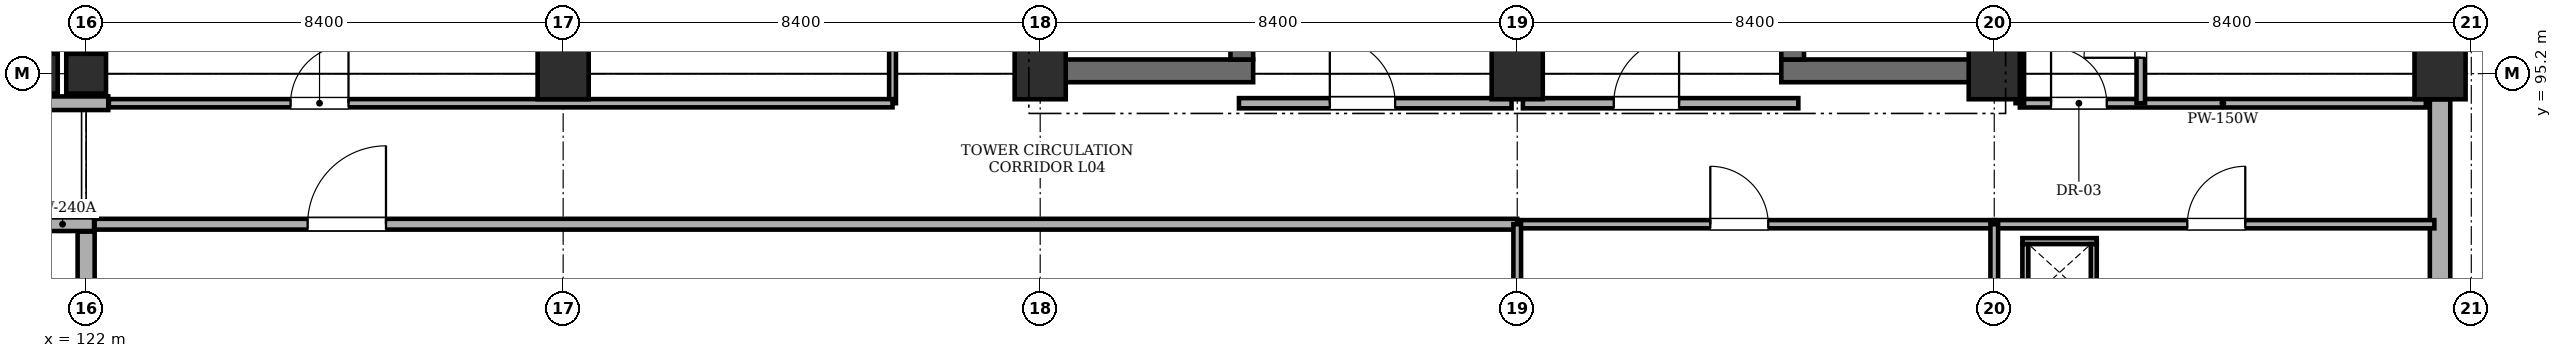
"""IFC4 building model, lengths in metres.
Left out: names, types, materials, properties, quantities, classifications, styles, units other than length and angle.
Written with IfcOpenShell. Run it as: python <this file> out.ifc"""

import sys

from ifc_helpers import new_model, si_unit, direction, frame, frame_2d, origin, origin_2d, place, context, subcontext, project, spatial, rectangle, extrude, element, fill, save


model = new_model("IFC4")
c1 = context("Model", 3, precision=1e-05, world=origin(), true_north=direction((0.0, 1.0)))
c2 = subcontext(c1, "Body", "Model", "MODEL_VIEW")
j1 = project(units=[si_unit("LENGTHUNIT", "METRE"), si_unit("PLANEANGLEUNIT", "RADIAN")], contexts=[c1])
p1 = place(None, origin())
s1 = spatial("IfcSite", under=j1, at=p1, CompositionType="ELEMENT")
p2 = place(p1, origin())
s2 = spatial("IfcBuilding", under=s1, at=p2, CompositionType="ELEMENT")
p3 = place(p2, frame((0.0, 0.0, 14.7)))
s3 = spatial("IfcBuildingStorey", under=s2, at=p3, CompositionType="ELEMENT", Elevation=14.7)
p4 = place(p3, frame((121.15, 95.2, 0.0), z_axis=(0.0, 0.0, 1.0), x_axis=(1.0, 0.0, 0.0)))
e1 = element("IfcColumn", 1, at=p4, inside=s3, PredefinedType="COLUMN", context=c2, shape_type="SweptSolid", body=[
    extrude(rectangle(XDim=0.7, YDim=0.7, at=origin_2d()), origin(), (0.0, 0.0, 1.0), 4.5),
])
p5 = place(p3, frame((122.0, 95.2, 0.0), z_axis=(0.0, 0.0, 1.0), x_axis=(1.0, 0.0, 0.0)))
e2 = element("IfcColumn", 2, at=p5, inside=s3, PredefinedType="COLUMN", context=c2, shape_type="SweptSolid", body=[
    extrude(rectangle(XDim=0.7, YDim=0.7, at=origin_2d()), origin(), (0.0, 0.0, 1.0), 4.26),
])
for number, where, z_axis, x_axis in (
    (3, (130.4, 95.2, 0.0), (0.0, 0.0, 1.0), (1.0, 0.0, 0.0)),
    (4, (138.8, 95.2, 0.0), (0.0, 0.0, 1.0), (1.0, 0.0, 0.0)),
    (5, (147.2, 95.2, 0.0), (0.0, 0.0, 1.0), (1.0, 0.0, 0.0)),
    (6, (155.6, 95.2, 0.0), (0.0, 0.0, 1.0), (1.0, 0.0, 0.0)),
    (7, (163.45, 95.2, 0.0), (0.0, 0.0, 1.0), (1.0, 0.0, 0.0)),
):
    element("IfcColumn", number, at=place(p3, frame(where, z_axis=z_axis, x_axis=x_axis)), inside=s3, PredefinedType="COLUMN", context=c2, shape_type="SweptSolid", body=[
        extrude(rectangle(XDim=0.9, YDim=0.9, at=origin_2d()), origin(), (0.0, 0.0, 1.0), 4.26),
    ])
p6 = place(p3, frame((138.65, 95.25, 0.0), z_axis=(0.0, 0.0, 1.0), x_axis=(1.0, 0.0, 0.0)))
e8 = element("IfcWall", 8, at=p6, inside=s3, PredefinedType="SHEAR", context=c2, shape_type="SweptSolid", body=[
    extrude(rectangle(XDim=3.9, YDim=0.4, at=frame_2d((1.95, 0.0))), origin(), (0.0, 0.0, 1.0), 4.26),
])
p7 = place(p3, frame((138.85, 95.45, 0.0), z_axis=(0.0, 0.0, 1.0), x_axis=(0.0, 1.0, 0.0)))
e9 = element("IfcWall", 9, at=p7, inside=s3, PredefinedType="SHEAR", context=c2, shape_type="SweptSolid", body=[
    extrude(rectangle(XDim=7.9, YDim=0.4, at=frame_2d((3.95, 0.0))), origin(), (0.0, 0.0, 1.0), 4.26),
])
p8 = place(p3, frame((142.35, 95.45, 0.0), z_axis=(0.0, 0.0, 1.0), x_axis=(0.0, 1.0, 0.0)))
e10 = element("IfcWall", 10, at=p8, inside=s3, PredefinedType="SHEAR", context=c2, shape_type="SweptSolid", body=[
    extrude(rectangle(XDim=7.9, YDim=0.4, at=frame_2d((3.95, 0.0))), origin(), (0.0, 0.0, 1.0), 4.26),
])
p9 = place(p8, frame((0.22, 0.0, 0.0)))
e11 = element("IfcOpeningElement", 11, at=p9, cuts=e10, PredefinedType="OPENING", context=c2, shape_type="SweptSolid", body=[
    extrude(rectangle(XDim=1.15, YDim=2.15, at=frame_2d((0.575, 1.075))), frame((0.0, 0.21, 0.0), z_axis=(0.0, -1.0, 0.0), x_axis=(1.0, 0.0, 0.0)), (0.0, 0.0, 1.0), 0.42),
])
p10 = place(p3, frame((151.85, 95.25, 0.0), z_axis=(0.0, 0.0, 1.0), x_axis=(1.0, 0.0, 0.0)))
e12 = element("IfcWall", 12, at=p10, inside=s3, PredefinedType="SHEAR", context=c2, shape_type="SweptSolid", body=[
    extrude(rectangle(XDim=3.9, YDim=0.4, at=frame_2d((1.95, 0.0))), origin(), (0.0, 0.0, 1.0), 4.26),
])
p11 = place(p3, frame((152.05, 95.45, 0.0), z_axis=(0.0, 0.0, 1.0), x_axis=(0.0, 1.0, 0.0)))
e13 = element("IfcWall", 13, at=p11, inside=s3, PredefinedType="SHEAR", context=c2, shape_type="SweptSolid", body=[
    extrude(rectangle(XDim=7.9, YDim=0.4, at=frame_2d((3.95, 0.0))), origin(), (0.0, 0.0, 1.0), 4.26),
])
p12 = place(p11, frame((0.35, 0.0, 0.0)))
e14 = element("IfcOpeningElement", 14, at=p12, cuts=e13, PredefinedType="OPENING", context=c2, shape_type="SweptSolid", body=[
    extrude(rectangle(XDim=1.15, YDim=2.15, at=frame_2d((0.575, 1.075))), frame((0.0, 0.21, 0.0), z_axis=(0.0, -1.0, 0.0), x_axis=(1.0, 0.0, 0.0)), (0.0, 0.0, 1.0), 0.42),
])
p13 = place(p3, frame((155.55, 95.45, 0.0), z_axis=(0.0, 0.0, 1.0), x_axis=(0.0, 1.0, 0.0)))
e15 = element("IfcWall", 15, at=p13, inside=s3, PredefinedType="SHEAR", context=c2, shape_type="SweptSolid", body=[
    extrude(rectangle(XDim=7.9, YDim=0.4, at=frame_2d((3.95, 0.0))), origin(), (0.0, 0.0, 1.0), 4.26),
])
p14 = place(p3, frame((163.45, 94.75, 0.0), z_axis=(0.0, 0.0, 1.0), x_axis=(0.0, -1.0, 0.0)))
e16 = element("IfcWall", 16, at=p14, inside=s3, PredefinedType="STANDARD", context=c2, shape_type="SweptSolid", body=[
    extrude(rectangle(XDim=7.5, YDim=0.36, at=frame_2d((3.75, 0.0))), origin(), (0.0, 0.0, 1.0), 3.56),
])
p15 = place(p14, frame((4.2, 0.0, 1.1)))
e17 = element("IfcOpeningElement", 17, at=p15, cuts=e16, PredefinedType="OPENING", context=c2, shape_type="SweptSolid", body=[
    extrude(rectangle(XDim=1.8, YDim=1.8, at=frame_2d((0.9, 0.9))), frame((0.0, 0.19, 0.0), z_axis=(0.0, -1.0, 0.0), x_axis=(1.0, 0.0, 0.0)), (0.0, 0.0, 1.0), 0.38),
])
p16 = place(p3, frame((122.0, 87.15, 0.0), z_axis=(0.0, 0.0, 1.0), x_axis=(0.0, 1.0, 0.0)))
e18 = element("IfcWall", 18, at=p16, inside=s3, PredefinedType="STANDARD", context=c2, shape_type="SweptSolid", body=[
    extrude(rectangle(XDim=5.27, YDim=0.3, at=frame_2d((2.635, 0.0))), origin(), (0.0, 0.0, 1.0), 3.51),
])
p17 = place(p3, frame((122.14, 92.55, 0.0), z_axis=(0.0, 0.0, 1.0), x_axis=(-1.0, 0.0, 0.0)))
e19 = element("IfcWall", 19, at=p17, inside=s3, PredefinedType="STANDARD", context=c2, shape_type="SweptSolid", body=[
    extrude(rectangle(XDim=1.11, YDim=0.24, at=frame_2d((0.555, 0.0))), origin(), (0.0, 0.0, 1.0), 4.26),
])
p18 = place(p3, frame((121.03, 94.68, 0.0), z_axis=(0.0, 0.0, 1.0), x_axis=(1.0, 0.0, 0.0)))
e20 = element("IfcWall", 20, at=p18, inside=s3, PredefinedType="STANDARD", context=c2, shape_type="SweptSolid", body=[
    extrude(rectangle(XDim=1.36, YDim=0.24, at=frame_2d((0.68, 0.0))), origin(), (0.0, 0.0, 1.0), 4.26),
])
p19 = place(p3, frame((122.0, 95.55, 0.0), z_axis=(0.0, 0.0, 1.0), x_axis=(0.0, 1.0, 0.0)))
e21 = element("IfcWall", 21, at=p19, inside=s3, PredefinedType="STANDARD", context=c2, shape_type="SweptSolid", body=[
    extrude(rectangle(XDim=7.7, YDim=0.3, at=frame_2d((3.85, 0.0))), origin(), (0.0, 0.0, 1.0), 3.51),
])
p20 = place(p3, frame((142.3, 94.68, 0.0), z_axis=(0.0, 0.0, 1.0), x_axis=(1.0, 0.0, 0.0)))
e22 = element("IfcWall", 22, at=p20, inside=s3, PredefinedType="STANDARD", context=c2, shape_type="SweptSolid", body=[
    extrude(rectangle(XDim=4.8, YDim=0.18, at=frame_2d((2.4, 0.0))), origin(), (0.0, 0.0, 1.0), 4.26),
])
p21 = place(p20, frame((1.6, 0.0, 0.0)))
e23 = element("IfcOpeningElement", 23, at=p21, cuts=e22, PredefinedType="OPENING", context=c2, shape_type="SweptSolid", body=[
    extrude(rectangle(XDim=1.15, YDim=2.15, at=frame_2d((0.575, 1.075))), frame((0.0, 0.1, 0.0), z_axis=(0.0, -1.0, 0.0), x_axis=(1.0, 0.0, 0.0)), (0.0, 0.0, 1.0), 0.2),
])
p22 = place(p3, frame((147.3, 94.68, 0.0), z_axis=(0.0, 0.0, 1.0), x_axis=(1.0, 0.0, 0.0)))
e24 = element("IfcWall", 24, at=p22, inside=s3, PredefinedType="STANDARD", context=c2, shape_type="SweptSolid", body=[
    extrude(rectangle(XDim=4.85, YDim=0.18, at=frame_2d((2.425, 0.0))), origin(), (0.0, 0.0, 1.0), 4.26),
])
p23 = place(p22, frame((1.6, 0.0, 0.0)))
e25 = element("IfcOpeningElement", 25, at=p23, cuts=e24, PredefinedType="OPENING", context=c2, shape_type="SweptSolid", body=[
    extrude(rectangle(XDim=1.15, YDim=2.15, at=frame_2d((0.575, 1.075))), frame((0.0, 0.1, 0.0), z_axis=(0.0, -1.0, 0.0), x_axis=(1.0, 0.0, 0.0)), (0.0, 0.0, 1.0), 0.2),
])
p24 = place(p3, frame((156.05, 94.68, 0.0), z_axis=(0.0, 0.0, 1.0), x_axis=(1.0, 0.0, 0.0)))
e26 = element("IfcWall", 26, at=p24, inside=s3, PredefinedType="PARTITIONING", context=c2, shape_type="SweptSolid", body=[
    extrude(rectangle(XDim=7.15, YDim=0.15, at=frame_2d((3.575, 0.0))), origin(), (0.0, 0.0, 1.0), 4.26),
])
p25 = place(p24, frame((0.55, 0.0, 0.0)))
e27 = element("IfcOpeningElement", 27, at=p25, cuts=e26, PredefinedType="OPENING", context=c2, shape_type="SweptSolid", body=[
    extrude(rectangle(XDim=0.98, YDim=2.12, at=frame_2d((0.49, 1.06))), frame((0.0, 0.085, 0.0), z_axis=(0.0, -1.0, 0.0), x_axis=(1.0, 0.0, 0.0)), (0.0, 0.0, 1.0), 0.17),
])
p26 = place(p3, frame((158.18, 94.68, 0.0), z_axis=(0.0, 0.0, 1.0), x_axis=(0.0, 1.0, 0.0)))
e28 = element("IfcWall", 28, at=p26, inside=s3, PredefinedType="PARTITIONING", context=c2, shape_type="SweptSolid", body=[
    extrude(rectangle(XDim=8.57, YDim=0.15, at=frame_2d((4.285, 0.0))), origin(), (0.0, 0.0, 1.0), 4.26),
])
p27 = place(p26, frame((0.8, 0.0, 0.0)))
e29 = element("IfcOpeningElement", 29, at=p27, cuts=e28, PredefinedType="OPENING", context=c2, shape_type="SweptSolid", body=[
    extrude(rectangle(XDim=1.0, YDim=2.12, at=frame_2d((0.5, 1.06))), frame((0.0, 0.085, 0.0), z_axis=(0.0, -1.0, 0.0), x_axis=(1.0, 0.0, 0.0)), (0.0, 0.0, 1.0), 0.17),
])
p28 = place(p26, frame((3.5, 0.0, 0.0)))
e30 = element("IfcOpeningElement", 30, at=p28, cuts=e28, PredefinedType="OPENING", context=c2, shape_type="SweptSolid", body=[
    extrude(rectangle(XDim=0.92, YDim=2.1, at=frame_2d((0.46, 1.05))), frame((0.0, 0.085, 0.0), z_axis=(0.0, -1.0, 0.0), x_axis=(1.0, 0.0, 0.0)), (0.0, 0.0, 1.0), 0.17),
])
p29 = place(p26, frame((6.4, 0.0, 0.0)))
e31 = element("IfcOpeningElement", 31, at=p29, cuts=e28, PredefinedType="OPENING", context=c2, shape_type="SweptSolid", body=[
    extrude(rectangle(XDim=0.92, YDim=2.1, at=frame_2d((0.46, 1.05))), frame((0.0, 0.085, 0.0), z_axis=(0.0, -1.0, 0.0), x_axis=(1.0, 0.0, 0.0)), (0.0, 0.0, 1.0), 0.17),
])
p30 = place(p3, frame((156.05, 94.68, 0.0), z_axis=(0.0, 0.0, 1.0), x_axis=(0.0, 1.0, 0.0)))
e32 = element("IfcWall", 32, at=p30, inside=s3, PredefinedType="PARTITIONING", context=c2, shape_type="SweptSolid", body=[
    extrude(rectangle(XDim=8.57, YDim=0.15, at=frame_2d((4.285, 0.0))), origin(), (0.0, 0.0, 1.0), 4.26),
])
p31 = place(p3, frame((136.2, 94.68, 0.0), z_axis=(0.0, 0.0, 1.0), x_axis=(0.0, 1.0, 0.0)))
e33 = element("IfcWall", 33, at=p31, inside=s3, PredefinedType="PARTITIONING", context=c2, shape_type="SweptSolid", body=[
    extrude(rectangle(XDim=9.07, YDim=0.12, at=frame_2d((4.535, 0.0))), origin(), (0.0, 0.0, 1.0), 4.26),
])
p32 = place(p3, frame((122.4, 94.68, 0.0), z_axis=(0.0, 0.0, 1.0), x_axis=(1.0, 0.0, 0.0)))
e34 = element("IfcWall", 34, at=p32, inside=s3, PredefinedType="PARTITIONING", context=c2, shape_type="SweptSolid", body=[
    extrude(rectangle(XDim=13.8, YDim=0.145, at=frame_2d((6.9, 0.0))), origin(), (0.0, 0.0, 1.0), 4.26),
])
p33 = place(p32, frame((3.2, 0.0, 0.0)))
e35 = element("IfcOpeningElement", 35, at=p33, cuts=e34, PredefinedType="OPENING", context=c2, shape_type="SweptSolid", body=[
    extrude(rectangle(XDim=1.02, YDim=2.15, at=frame_2d((0.51, 1.075))), frame((0.0, 0.083, 0.0), z_axis=(0.0, -1.0, 0.0), x_axis=(1.0, 0.0, 0.0)), (0.0, 0.0, 1.0), 0.165),
])
p34 = place(p3, frame((122.15, 92.55, 0.0), z_axis=(0.0, 0.0, 1.0), x_axis=(1.0, 0.0, 0.0)))
e36 = element("IfcWall", 36, at=p34, inside=s3, PredefinedType="SOLIDWALL", context=c2, shape_type="SweptSolid", body=[
    extrude(rectangle(XDim=25.05, YDim=0.19, at=frame_2d((12.525, 0.0))), origin(), (0.0, 0.0, 1.0), 4.26),
])
p35 = place(p34, frame((3.75, 0.0, 0.0)))
e37 = element("IfcOpeningElement", 37, at=p35, cuts=e36, PredefinedType="OPENING", context=c2, shape_type="SweptSolid", body=[
    extrude(rectangle(XDim=1.38, YDim=2.22, at=frame_2d((0.69, 1.11))), frame((0.0, 0.105, 0.0), z_axis=(0.0, -1.0, 0.0), x_axis=(1.0, 0.0, 0.0)), (0.0, 0.0, 1.0), 0.21),
])
p36 = place(p3, frame((147.2, 92.55, 0.0), z_axis=(0.0, 0.0, 1.0), x_axis=(1.0, 0.0, 0.0)))
e38 = element("IfcWall", 38, at=p36, inside=s3, PredefinedType="PARTITIONING", context=c2, shape_type="SweptSolid", body=[
    extrude(rectangle(XDim=8.4, YDim=0.145, at=frame_2d((4.2, 0.0))), origin(), (0.0, 0.0, 1.0), 4.26),
])
p37 = place(p36, frame((3.4, 0.0, 0.0)))
e39 = element("IfcOpeningElement", 39, at=p37, cuts=e38, PredefinedType="OPENING", context=c2, shape_type="SweptSolid", body=[
    extrude(rectangle(XDim=1.02, YDim=2.15, at=frame_2d((0.51, 1.075))), frame((0.0, 0.083, 0.0), z_axis=(0.0, -1.0, 0.0), x_axis=(1.0, 0.0, 0.0)), (0.0, 0.0, 1.0), 0.165),
])
p38 = place(p3, frame((147.2, 78.55, 0.0), z_axis=(0.0, 0.0, 1.0), x_axis=(0.0, 1.0, 0.0)))
e40 = element("IfcWall", 40, at=p38, inside=s3, PredefinedType="PARTITIONING", context=c2, shape_type="SweptSolid", body=[
    extrude(rectangle(XDim=14.0, YDim=0.135, at=frame_2d((7.0, 0.0))), origin(), (0.0, 0.0, 1.0), 3.51),
])
p39 = place(p3, frame((155.6, 92.55, 0.0), z_axis=(0.0, 0.0, 1.0), x_axis=(1.0, 0.0, 0.0)))
e41 = element("IfcWall", 41, at=p39, inside=s3, PredefinedType="PARTITIONING", context=c2, shape_type="SweptSolid", body=[
    extrude(rectangle(XDim=7.75, YDim=0.145, at=frame_2d((3.875, 0.0))), origin(), (0.0, 0.0, 1.0), 4.26),
])
p40 = place(p39, frame((3.4, 0.0, 0.0)))
e42 = element("IfcOpeningElement", 42, at=p40, cuts=e41, PredefinedType="OPENING", context=c2, shape_type="SweptSolid", body=[
    extrude(rectangle(XDim=1.02, YDim=2.15, at=frame_2d((0.51, 1.075))), frame((0.0, 0.083, 0.0), z_axis=(0.0, -1.0, 0.0), x_axis=(1.0, 0.0, 0.0)), (0.0, 0.0, 1.0), 0.165),
])
p41 = place(p3, frame((155.6, 78.55, 0.0), z_axis=(0.0, 0.0, 1.0), x_axis=(0.0, 1.0, 0.0)))
e43 = element("IfcWall", 43, at=p41, inside=s3, PredefinedType="PARTITIONING", context=c2, shape_type="SweptSolid", body=[
    extrude(rectangle(XDim=14.0, YDim=0.135, at=frame_2d((7.0, 0.0))), origin(), (0.0, 0.0, 1.0), 3.51),
])
p42 = place(p3, frame((156.095, 92.252, 0.0), z_axis=(0.0, 0.0, 1.0), x_axis=(1.0, 0.0, 0.0)))
e44 = element("IfcWall", 44, at=p42, inside=s3, PredefinedType="PARTITIONING", context=c2, shape_type="SweptSolid", body=[
    extrude(rectangle(XDim=1.31, YDim=0.105, at=frame_2d((0.655, 0.0))), origin(), (0.0, 0.0, 1.0), 4.26),
])
for number, where, z_axis, x_axis in (
    (45, (156.147, 91.2, 0.0), (0.0, 0.0, 1.0), (0.0, 1.0, 0.0)),
    (46, (157.353, 91.2, 0.0), (0.0, 0.0, 1.0), (0.0, 1.0, 0.0)),
):
    element("IfcWall", number, at=place(p3, frame(where, z_axis=z_axis, x_axis=x_axis)), inside=s3, PredefinedType="PARTITIONING", context=c2, shape_type="SweptSolid", body=[
        extrude(rectangle(XDim=1.0, YDim=0.105, at=frame_2d((0.5, 0.0))), origin(), (0.0, 0.0, 1.0), 4.26),
    ])
p43 = place(p21, origin())
e47 = element("IfcDoor", 47, at=p43, inside=s3, OperationType="SINGLE_SWING_LEFT", PredefinedType="DOOR", context=c2, shape_type="SweptSolid", body=[
    extrude(rectangle(XDim=1.15, YDim=2.15, at=frame_2d((0.575, 1.075))), frame((0.0, 0.025, 0.0), z_axis=(0.0, -1.0, 0.0), x_axis=(1.0, 0.0, 0.0)), (0.0, 0.0, 1.0), 0.05),
])
fill(e23, e47)
p44 = place(p23, origin())
e48 = element("IfcDoor", 48, at=p44, inside=s3, OperationType="SINGLE_SWING_RIGHT", PredefinedType="DOOR", context=c2, shape_type="SweptSolid", body=[
    extrude(rectangle(XDim=1.15, YDim=2.15, at=frame_2d((0.575, 1.075))), frame((0.0, 0.025, 0.0), z_axis=(0.0, -1.0, 0.0), x_axis=(1.0, 0.0, 0.0)), (0.0, 0.0, 1.0), 0.05),
])
fill(e25, e48)
p45 = place(p25, origin())
e49 = element("IfcDoor", 49, at=p45, inside=s3, OperationType="SINGLE_SWING_LEFT", PredefinedType="DOOR", context=c2, shape_type="SweptSolid", body=[
    extrude(rectangle(XDim=0.98, YDim=2.12, at=frame_2d((0.49, 1.06))), frame((0.0, 0.025, 0.0), z_axis=(0.0, -1.0, 0.0), x_axis=(1.0, 0.0, 0.0)), (0.0, 0.0, 1.0), 0.05),
])
fill(e27, e49)
p46 = place(p27, origin())
e50 = element("IfcDoor", 50, at=p46, inside=s3, OperationType="SINGLE_SWING_LEFT", PredefinedType="DOOR", context=c2, shape_type="SweptSolid", body=[
    extrude(rectangle(XDim=1.0, YDim=2.12, at=frame_2d((0.5, 1.06))), frame((0.0, 0.025, 0.0), z_axis=(0.0, -1.0, 0.0), x_axis=(1.0, 0.0, 0.0)), (0.0, 0.0, 1.0), 0.05),
])
fill(e29, e50)
p47 = place(p33, origin())
e51 = element("IfcDoor", 51, at=p47, inside=s3, OperationType="SINGLE_SWING_RIGHT", PredefinedType="DOOR", context=c2, shape_type="SweptSolid", body=[
    extrude(rectangle(XDim=1.02, YDim=2.15, at=frame_2d((0.51, 1.075))), frame((0.0, 0.025, 0.0), z_axis=(0.0, -1.0, 0.0), x_axis=(1.0, 0.0, 0.0)), (0.0, 0.0, 1.0), 0.05),
])
fill(e35, e51)
p48 = place(p35, origin())
e52 = element("IfcDoor", 52, at=p48, inside=s3, OperationType="SINGLE_SWING_RIGHT", PredefinedType="DOOR", context=c2, shape_type="SweptSolid", body=[
    extrude(rectangle(XDim=1.38, YDim=2.22, at=frame_2d((0.69, 1.11))), frame((0.0, 0.025, 0.0), z_axis=(0.0, -1.0, 0.0), x_axis=(1.0, 0.0, 0.0)), (0.0, 0.0, 1.0), 0.05),
])
fill(e37, e52)
p49 = place(p37, origin())
e53 = element("IfcDoor", 53, at=p49, inside=s3, OperationType="SINGLE_SWING_LEFT", PredefinedType="DOOR", context=c2, shape_type="SweptSolid", body=[
    extrude(rectangle(XDim=1.02, YDim=2.15, at=frame_2d((0.51, 1.075))), frame((0.0, 0.025, 0.0), z_axis=(0.0, -1.0, 0.0), x_axis=(1.0, 0.0, 0.0)), (0.0, 0.0, 1.0), 0.05),
])
fill(e39, e53)
p50 = place(p40, origin())
e54 = element("IfcDoor", 54, at=p50, inside=s3, OperationType="SINGLE_SWING_RIGHT", PredefinedType="DOOR", context=c2, shape_type="SweptSolid", body=[
    extrude(rectangle(XDim=1.02, YDim=2.15, at=frame_2d((0.51, 1.075))), frame((0.0, 0.025, 0.0), z_axis=(0.0, -1.0, 0.0), x_axis=(1.0, 0.0, 0.0)), (0.0, 0.0, 1.0), 0.05),
])
fill(e42, e54)
save(model, sys.argv[1])
